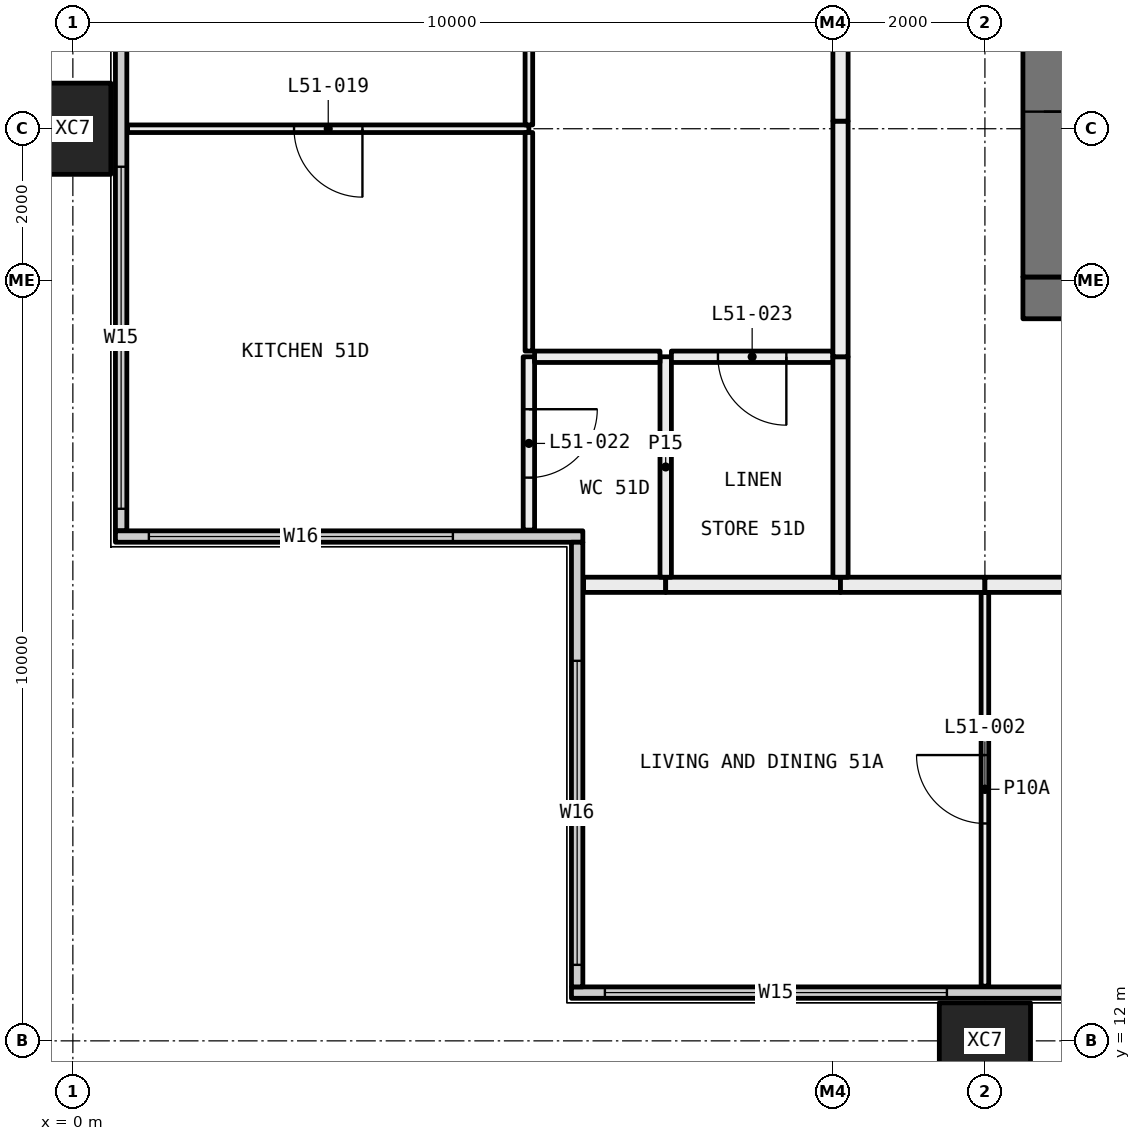
"""IFC4 building model, lengths in metres.
Left out: names, types, materials, properties, quantities, classifications, styles, units other than length and angle.
Written with IfcOpenShell. Run it as: python <this file> out.ifc"""

import sys

from ifc_helpers import new_model, si_unit, direction, frame, frame_2d, origin, origin_2d, place, context, subcontext, project, spatial, rectangle, hollow_rectangle, extrude, element, fill, save


model = new_model("IFC4")
c1 = context("Model", 3, precision=1e-05, world=origin(), true_north=direction((0.0, 1.0)))
c2 = subcontext(c1, "Body", "Model", "MODEL_VIEW")
j1 = project(units=[si_unit("LENGTHUNIT", "METRE"), si_unit("PLANEANGLEUNIT", "RADIAN")], contexts=[c1])
p1 = place(None, origin())
s1 = spatial("IfcSite", under=j1, at=p1, CompositionType="ELEMENT")
p2 = place(p1, origin())
s2 = spatial("IfcBuilding", under=s1, at=p2, CompositionType="ELEMENT")
p3 = place(p2, frame((0.0, 0.0, 192.75)))
s3 = spatial("IfcBuildingStorey", under=s2, at=p3, CompositionType="ELEMENT", Elevation=192.75)
for number, where, z_axis, x_axis in (
    (1, (0.0, 24.0, -0.4), (0.0, 0.0, 1.0), (0.0, 1.0, 0.0)),
    (2, (12.0, 12.0, -0.4), (0.0, 0.0, 1.0), (1.0, 0.0, 0.0)),
):
    element("IfcColumn", number, at=place(p3, frame(where, z_axis=z_axis, x_axis=x_axis)), inside=s3, PredefinedType="COLUMN", context=c2, shape_type="SweptSolid", body=[
        extrude(hollow_rectangle(XDim=1.2, YDim=1.0, WallThickness=0.045, at=origin_2d()), origin(), (0.0, 0.0, 1.0), 3.45),
    ])
p4 = place(p3, frame((6.56, 12.635, 0.0), z_axis=(0.0, 0.0, 1.0), x_axis=(1.0, 0.0, 0.0)))
e3 = element("IfcWall", 3, at=p4, inside=s3, PredefinedType="ELEMENTEDWALL", context=c2, shape_type="SweptSolid", body=[
    extrude(rectangle(XDim=46.88, YDim=0.15, at=frame_2d((23.44, 0.0))), origin(), (0.0, 0.0, 1.0), 3.05),
])
p5 = place(p4, frame((0.44, 0.0, 0.45)))
e4 = element("IfcOpeningElement", 4, at=p5, cuts=e3, PredefinedType="OPENING", context=c2, shape_type="SweptSolid", body=[
    extrude(rectangle(XDim=4.5, YDim=2.55, at=frame_2d((2.25, 1.275))), frame((0.0, 0.085, 0.0), z_axis=(0.0, -1.0, 0.0), x_axis=(1.0, 0.0, 0.0)), (0.0, 0.0, 1.0), 0.17),
])
p6 = place(p4, frame((7.69, 0.0, 0.45)))
e5 = element("IfcOpeningElement", 5, at=p6, cuts=e3, PredefinedType="OPENING", context=c2, shape_type="SweptSolid", body=[
    extrude(rectangle(XDim=3.25, YDim=2.55, at=frame_2d((1.625, 1.275))), frame((0.0, 0.085, 0.0), z_axis=(0.0, -1.0, 0.0), x_axis=(1.0, 0.0, 0.0)), (0.0, 0.0, 1.0), 0.17),
])
p7 = place(p4, frame((11.94, 0.0, 0.45)))
e6 = element("IfcOpeningElement", 6, at=p7, cuts=e3, PredefinedType="OPENING", context=c2, shape_type="SweptSolid", body=[
    extrude(rectangle(XDim=3.25, YDim=2.55, at=frame_2d((1.625, 1.275))), frame((0.0, 0.085, 0.0), z_axis=(0.0, -1.0, 0.0), x_axis=(1.0, 0.0, 0.0)), (0.0, 0.0, 1.0), 0.17),
])
p8 = place(p4, frame((19.69, 0.0, 0.45)))
e7 = element("IfcOpeningElement", 7, at=p8, cuts=e3, PredefinedType="OPENING", context=c2, shape_type="SweptSolid", body=[
    extrude(rectangle(XDim=3.25, YDim=2.55, at=frame_2d((1.625, 1.275))), frame((0.0, 0.085, 0.0), z_axis=(0.0, -1.0, 0.0), x_axis=(1.0, 0.0, 0.0)), (0.0, 0.0, 1.0), 0.17),
])
p9 = place(p4, frame((23.94, 0.0, 0.45)))
e8 = element("IfcOpeningElement", 8, at=p9, cuts=e3, PredefinedType="OPENING", context=c2, shape_type="SweptSolid", body=[
    extrude(rectangle(XDim=2.0, YDim=2.55, at=frame_2d((1.0, 1.275))), frame((0.0, 0.085, 0.0), z_axis=(0.0, -1.0, 0.0), x_axis=(1.0, 0.0, 0.0)), (0.0, 0.0, 1.0), 0.17),
])
p10 = place(p4, frame((31.69, 0.0, 0.45)))
e9 = element("IfcOpeningElement", 9, at=p10, cuts=e3, PredefinedType="OPENING", context=c2, shape_type="SweptSolid", body=[
    extrude(rectangle(XDim=3.25, YDim=2.55, at=frame_2d((1.625, 1.275))), frame((0.0, 0.085, 0.0), z_axis=(0.0, -1.0, 0.0), x_axis=(1.0, 0.0, 0.0)), (0.0, 0.0, 1.0), 0.17),
])
p11 = place(p4, frame((35.94, 0.0, 0.45)))
e10 = element("IfcOpeningElement", 10, at=p11, cuts=e3, PredefinedType="OPENING", context=c2, shape_type="SweptSolid", body=[
    extrude(rectangle(XDim=3.25, YDim=2.55, at=frame_2d((1.625, 1.275))), frame((0.0, 0.085, 0.0), z_axis=(0.0, -1.0, 0.0), x_axis=(1.0, 0.0, 0.0)), (0.0, 0.0, 1.0), 0.17),
])
p12 = place(p4, frame((41.94, 0.0, 0.45)))
e11 = element("IfcOpeningElement", 11, at=p12, cuts=e3, PredefinedType="OPENING", context=c2, shape_type="SweptSolid", body=[
    extrude(rectangle(XDim=4.5, YDim=2.55, at=frame_2d((2.25, 1.275))), frame((0.0, 0.085, 0.0), z_axis=(0.0, -1.0, 0.0), x_axis=(1.0, 0.0, 0.0)), (0.0, 0.0, 1.0), 0.17),
])
p13 = place(p3, frame((0.635, 18.71, 0.0), z_axis=(0.0, 0.0, 1.0), x_axis=(0.0, 1.0, 0.0)))
e12 = element("IfcWall", 12, at=p13, inside=s3, PredefinedType="ELEMENTEDWALL", context=c2, shape_type="SweptSolid", body=[
    extrude(rectangle(XDim=22.58, YDim=0.15, at=frame_2d((11.29, 0.0))), origin(), (0.0, 0.0, 1.0), 3.05),
])
p14 = place(p13, frame((0.29, 0.0, 0.45)))
e13 = element("IfcOpeningElement", 13, at=p14, cuts=e12, PredefinedType="OPENING", context=c2, shape_type="SweptSolid", body=[
    extrude(rectangle(XDim=4.5, YDim=2.55, at=frame_2d((2.25, 1.275))), frame((0.0, 0.085, 0.0), z_axis=(0.0, -1.0, 0.0), x_axis=(1.0, 0.0, 0.0)), (0.0, 0.0, 1.0), 0.17),
])
p15 = place(p13, frame((7.54, 0.0, 0.45)))
e14 = element("IfcOpeningElement", 14, at=p15, cuts=e12, PredefinedType="OPENING", context=c2, shape_type="SweptSolid", body=[
    extrude(rectangle(XDim=3.25, YDim=2.55, at=frame_2d((1.625, 1.275))), frame((0.0, 0.085, 0.0), z_axis=(0.0, -1.0, 0.0), x_axis=(1.0, 0.0, 0.0)), (0.0, 0.0, 1.0), 0.17),
])
p16 = place(p13, frame((11.79, 0.0, 0.45)))
e15 = element("IfcOpeningElement", 15, at=p16, cuts=e12, PredefinedType="OPENING", context=c2, shape_type="SweptSolid", body=[
    extrude(rectangle(XDim=2.0, YDim=2.55, at=frame_2d((1.0, 1.275))), frame((0.0, 0.085, 0.0), z_axis=(0.0, -1.0, 0.0), x_axis=(1.0, 0.0, 0.0)), (0.0, 0.0, 1.0), 0.17),
])
p17 = place(p13, frame((17.79, 0.0, 0.45)))
e16 = element("IfcOpeningElement", 16, at=p17, cuts=e12, PredefinedType="OPENING", context=c2, shape_type="SweptSolid", body=[
    extrude(rectangle(XDim=4.5, YDim=2.55, at=frame_2d((2.25, 1.275))), frame((0.0, 0.085, 0.0), z_axis=(0.0, -1.0, 0.0), x_axis=(1.0, 0.0, 0.0)), (0.0, 0.0, 1.0), 0.17),
])
p18 = place(p3, frame((0.56, 18.635, 0.0), z_axis=(0.0, 0.0, 1.0), x_axis=(1.0, 0.0, 0.0)))
e17 = element("IfcWall", 17, at=p18, inside=s3, PredefinedType="ELEMENTEDWALL", context=c2, shape_type="SweptSolid", body=[
    extrude(rectangle(XDim=6.15, YDim=0.15, at=frame_2d((3.075, 0.0))), origin(), (0.0, 0.0, 1.0), 3.05),
])
p19 = place(p18, frame((0.44, 0.0, 0.45)))
e18 = element("IfcOpeningElement", 18, at=p19, cuts=e17, PredefinedType="OPENING", context=c2, shape_type="SweptSolid", body=[
    extrude(rectangle(XDim=4.0, YDim=2.55, at=frame_2d((2.0, 1.275))), frame((0.0, 0.085, 0.0), z_axis=(0.0, -1.0, 0.0), x_axis=(1.0, 0.0, 0.0)), (0.0, 0.0, 1.0), 0.17),
])
p20 = place(p3, frame((6.635, 12.71, 0.0), z_axis=(0.0, 0.0, 1.0), x_axis=(0.0, 1.0, 0.0)))
e19 = element("IfcWall", 19, at=p20, inside=s3, PredefinedType="ELEMENTEDWALL", context=c2, shape_type="SweptSolid", body=[
    extrude(rectangle(XDim=5.85, YDim=0.15, at=frame_2d((2.925, 0.0))), origin(), (0.0, 0.0, 1.0), 3.05),
])
p21 = place(p20, frame((0.29, 0.0, 0.45)))
e20 = element("IfcOpeningElement", 20, at=p21, cuts=e19, PredefinedType="OPENING", context=c2, shape_type="SweptSolid", body=[
    extrude(rectangle(XDim=4.0, YDim=2.55, at=frame_2d((2.0, 1.275))), frame((0.0, 0.085, 0.0), z_axis=(0.0, -1.0, 0.0), x_axis=(1.0, 0.0, 0.0)), (0.0, 0.0, 1.0), 0.17),
])
p22 = place(p3, frame((12.0, 12.72, 0.0), z_axis=(0.0, 0.0, 1.0), x_axis=(0.0, 1.0, 0.0)))
e21 = element("IfcWall", 21, at=p22, inside=s3, PredefinedType="PARTITIONING", context=c2, shape_type="SweptSolid", body=[
    extrude(rectangle(XDim=5.18, YDim=0.1, at=frame_2d((2.59, 0.0))), origin(), (0.0, 0.0, 1.0), 3.05),
])
p23 = place(p22, frame((2.14, 0.0, 0.0)))
e22 = element("IfcOpeningElement", 22, at=p23, cuts=e21, PredefinedType="OPENING", context=c2, shape_type="SweptSolid", body=[
    extrude(rectangle(XDim=0.9, YDim=2.1, at=frame_2d((0.45, 1.05))), frame((0.0, 0.06, 0.0), z_axis=(0.0, -1.0, 0.0), x_axis=(1.0, 0.0, 0.0)), (0.0, 0.0, 1.0), 0.12),
])
p24 = place(p3, frame((7.8, 18.0, 0.0), z_axis=(0.0, 0.0, 1.0), x_axis=(-1.0, 0.0, 0.0)))
e23 = element("IfcWall", 23, at=p24, inside=s3, PredefinedType="PARTITIONING", context=c2, shape_type="SweptSolid", body=[
    extrude(rectangle(XDim=1.08, YDim=0.2, at=frame_2d((0.54, 0.0))), origin(), (0.0, 0.0, 1.0), 3.05),
])
p25 = place(p3, frame((10.1, 18.0, 0.0), z_axis=(0.0, 0.0, 1.0), x_axis=(-1.0, 0.0, 0.0)))
e24 = element("IfcWall", 24, at=p25, inside=s3, PredefinedType="PARTITIONING", context=c2, shape_type="SweptSolid", body=[
    extrude(rectangle(XDim=2.3, YDim=0.2, at=frame_2d((1.15, 0.0))), origin(), (0.0, 0.0, 1.0), 3.05),
])
p26 = place(p3, frame((12.0, 18.0, 0.0), z_axis=(0.0, 0.0, 1.0), x_axis=(-1.0, 0.0, 0.0)))
e25 = element("IfcWall", 25, at=p26, inside=s3, PredefinedType="PARTITIONING", context=c2, shape_type="SweptSolid", body=[
    extrude(rectangle(XDim=1.9, YDim=0.2, at=frame_2d((0.95, 0.0))), origin(), (0.0, 0.0, 1.0), 3.05),
])
p27 = place(p3, frame((18.0, 18.0, 0.0), z_axis=(0.0, 0.0, 1.0), x_axis=(-1.0, 0.0, 0.0)))
e26 = element("IfcWall", 26, at=p27, inside=s3, PredefinedType="PARTITIONING", context=c2, shape_type="SweptSolid", body=[
    extrude(rectangle(XDim=6.0, YDim=0.2, at=frame_2d((3.0, 0.0))), origin(), (0.0, 0.0, 1.0), 3.05),
])
p28 = place(p27, frame((2.5, 0.0, 0.0)))
e27 = element("IfcOpeningElement", 27, at=p28, cuts=e26, PredefinedType="OPENING", context=c2, shape_type="SweptSolid", body=[
    extrude(rectangle(XDim=1.0, YDim=2.1, at=frame_2d((0.5, 1.05))), frame((0.0, 0.11, 0.0), z_axis=(0.0, -1.0, 0.0), x_axis=(1.0, 0.0, 0.0)), (0.0, 0.0, 1.0), 0.22),
])
p29 = place(p3, frame((6.0, 24.0, 0.0), z_axis=(0.0, 0.0, 1.0), x_axis=(-1.0, 0.0, 0.0)))
e28 = element("IfcWall", 28, at=p29, inside=s3, PredefinedType="PARTITIONING", context=c2, shape_type="SweptSolid", body=[
    extrude(rectangle(XDim=5.28, YDim=0.1, at=frame_2d((2.64, 0.0))), origin(), (0.0, 0.0, 1.0), 2.45),
])
p30 = place(p29, frame((2.19, 0.0, 0.0)))
e29 = element("IfcOpeningElement", 29, at=p30, cuts=e28, PredefinedType="OPENING", context=c2, shape_type="SweptSolid", body=[
    extrude(rectangle(XDim=0.9, YDim=2.1, at=frame_2d((0.45, 1.05))), frame((0.0, 0.06, 0.0), z_axis=(0.0, -1.0, 0.0), x_axis=(1.0, 0.0, 0.0)), (0.0, 0.0, 1.0), 0.12),
])
p31 = place(p3, frame((6.0, 18.72, 0.0), z_axis=(0.0, 0.0, 1.0), x_axis=(0.0, 1.0, 0.0)))
e30 = element("IfcWall", 30, at=p31, inside=s3, PredefinedType="PARTITIONING", context=c2, shape_type="SweptSolid", body=[
    extrude(rectangle(XDim=2.28, YDim=0.15, at=frame_2d((1.14, 0.0))), origin(), (0.0, 0.0, 1.0), 3.05),
])
p32 = place(p31, frame((0.69, 0.0, 0.0)))
e31 = element("IfcOpeningElement", 31, at=p32, cuts=e30, PredefinedType="OPENING", context=c2, shape_type="SweptSolid", body=[
    extrude(rectangle(XDim=0.9, YDim=2.1, at=frame_2d((0.45, 1.05))), frame((0.0, 0.085, 0.0), z_axis=(0.0, -1.0, 0.0), x_axis=(1.0, 0.0, 0.0)), (0.0, 0.0, 1.0), 0.17),
])
p33 = place(p3, frame((6.0, 21.075, 0.0), z_axis=(0.0, 0.0, 1.0), x_axis=(0.0, 1.0, 0.0)))
e32 = element("IfcWall", 32, at=p33, inside=s3, PredefinedType="PARTITIONING", context=c2, shape_type="SweptSolid", body=[
    extrude(rectangle(XDim=2.875, YDim=0.1, at=frame_2d((1.438, 0.0))), origin(), (0.0, 0.0, 1.0), 2.45),
])
p34 = place(p3, frame((6.0, 24.05, 0.0), z_axis=(0.0, 0.0, 1.0), x_axis=(0.0, 1.0, 0.0)))
e33 = element("IfcWall", 33, at=p34, inside=s3, PredefinedType="PARTITIONING", context=c2, shape_type="SweptSolid", body=[
    extrude(rectangle(XDim=8.95, YDim=0.1, at=frame_2d((4.475, 0.0))), origin(), (0.0, 0.0, 1.0), 2.45),
])
p35 = place(p3, frame((7.8, 18.1, 0.0), z_axis=(0.0, 0.0, 1.0), x_axis=(0.0, 1.0, 0.0)))
e34 = element("IfcWall", 34, at=p35, inside=s3, PredefinedType="PARTITIONING", context=c2, shape_type="SweptSolid", body=[
    extrude(rectangle(XDim=2.9, YDim=0.15, at=frame_2d((1.45, 0.0))), origin(), (0.0, 0.0, 1.0), 3.05),
])
p36 = place(p3, frame((7.725, 21.0, 0.0), z_axis=(0.0, 0.0, 1.0), x_axis=(-1.0, 0.0, 0.0)))
e35 = element("IfcWall", 35, at=p36, inside=s3, PredefinedType="PARTITIONING", context=c2, shape_type="SweptSolid", body=[
    extrude(rectangle(XDim=1.65, YDim=0.15, at=frame_2d((0.825, 0.0))), origin(), (0.0, 0.0, 1.0), 3.05),
])
p37 = place(p3, frame((10.0, 21.0, 0.0), z_axis=(0.0, 0.0, 1.0), x_axis=(-1.0, 0.0, 0.0)))
e36 = element("IfcWall", 36, at=p37, inside=s3, PredefinedType="PARTITIONING", context=c2, shape_type="SweptSolid", body=[
    extrude(rectangle(XDim=2.125, YDim=0.15, at=frame_2d((1.062, 0.0))), origin(), (0.0, 0.0, 1.0), 3.05),
])
p38 = place(p37, frame((0.613, 0.0, 0.0)))
e37 = element("IfcOpeningElement", 37, at=p38, cuts=e36, PredefinedType="OPENING", context=c2, shape_type="SweptSolid", body=[
    extrude(rectangle(XDim=0.9, YDim=2.1, at=frame_2d((0.45, 1.05))), frame((0.0, 0.085, 0.0), z_axis=(0.0, -1.0, 0.0), x_axis=(1.0, 0.0, 0.0)), (0.0, 0.0, 1.0), 0.17),
])
p39 = place(p3, frame((10.1, 18.1, 0.0), z_axis=(0.0, 0.0, 1.0), x_axis=(0.0, 1.0, 0.0)))
e38 = element("IfcWall", 38, at=p39, inside=s3, PredefinedType="PARTITIONING", context=c2, shape_type="SweptSolid", body=[
    extrude(rectangle(XDim=2.9, YDim=0.2, at=frame_2d((1.45, 0.0))), origin(), (0.0, 0.0, 1.0), 3.05),
])
p40 = place(p3, frame((10.1, 21.0, 0.0), z_axis=(0.0, 0.0, 1.0), x_axis=(0.0, 1.0, 0.0)))
e39 = element("IfcWall", 39, at=p40, inside=s3, PredefinedType="PARTITIONING", context=c2, shape_type="SweptSolid", body=[
    extrude(rectangle(XDim=3.1, YDim=0.2, at=frame_2d((1.55, 0.0))), origin(), (0.0, 0.0, 1.0), 2.45),
])
p41 = place(p3, frame((10.1, 24.1, 0.0), z_axis=(0.0, 0.0, 1.0), x_axis=(0.0, 1.0, 0.0)))
e40 = element("IfcWall", 40, at=p41, inside=s3, PredefinedType="PARTITIONING", context=c2, shape_type="SweptSolid", body=[
    extrude(rectangle(XDim=8.9, YDim=0.2, at=frame_2d((4.45, 0.0))), origin(), (0.0, 0.0, 1.0), 3.05),
])
p42 = place(p3, frame((12.5, 21.775, 0.0), z_axis=(0.0, 0.0, 1.0), x_axis=(1.0, 0.0, 0.0)))
e41 = element("IfcWall", 41, at=p42, inside=s3, PredefinedType="SHEAR", context=c2, shape_type="SweptSolid", body=[
    extrude(rectangle(XDim=11.0, YDim=0.55, at=frame_2d((5.5, 0.0))), origin(), (0.0, 0.0, 1.0), 3.05),
])
p43 = place(p3, frame((12.775, 22.05, 0.0), z_axis=(0.0, 0.0, 1.0), x_axis=(0.0, 1.0, 0.0)))
e42 = element("IfcWall", 42, at=p43, inside=s3, PredefinedType="SHEAR", context=c2, shape_type="SweptSolid", body=[
    extrude(rectangle(XDim=15.9, YDim=0.55, at=frame_2d((7.95, 0.0))), origin(), (0.0, 0.0, 1.0), 3.05),
])
p44 = place(p43, frame((8.4, 0.0, 0.0)))
e43 = element("IfcOpeningElement", 43, at=p44, cuts=e42, PredefinedType="OPENING", context=c2, shape_type="SweptSolid", body=[
    extrude(rectangle(XDim=1.6, YDim=2.1, at=frame_2d((0.8, 1.05))), frame((0.0, 0.285, 0.0), z_axis=(0.0, -1.0, 0.0), x_axis=(1.0, 0.0, 0.0)), (0.0, 0.0, 1.0), 0.57),
])
p45 = place(p43, frame((2.175, 0.0, 0.0)))
e44 = element("IfcOpeningElement", 44, at=p45, cuts=e42, PredefinedType="OPENING", context=c2, shape_type="SweptSolid", body=[
    extrude(rectangle(XDim=1.0, YDim=2.1, at=frame_2d((0.5, 1.05))), frame((0.0, 0.285, 0.0), z_axis=(0.0, -1.0, 0.0), x_axis=(1.0, 0.0, 0.0)), (0.0, 0.0, 1.0), 0.57),
])
p46 = place(p5, origin())
e45 = element("IfcWindow", 45, at=p46, inside=s3, PartitioningType="SINGLE_PANEL", PredefinedType="WINDOW", context=c2, shape_type="SweptSolid", body=[
    extrude(rectangle(XDim=4.5, YDim=2.55, at=frame_2d((2.25, 1.275))), frame((0.0, 0.03, 0.0), z_axis=(0.0, -1.0, 0.0), x_axis=(1.0, 0.0, 0.0)), (0.0, 0.0, 1.0), 0.06),
])
fill(e4, e45)
p47 = place(p14, origin())
e46 = element("IfcWindow", 46, at=p47, inside=s3, PartitioningType="SINGLE_PANEL", PredefinedType="WINDOW", context=c2, shape_type="SweptSolid", body=[
    extrude(rectangle(XDim=4.5, YDim=2.55, at=frame_2d((2.25, 1.275))), frame((0.0, 0.03, 0.0), z_axis=(0.0, -1.0, 0.0), x_axis=(1.0, 0.0, 0.0)), (0.0, 0.0, 1.0), 0.06),
])
fill(e13, e46)
p48 = place(p19, origin())
e47 = element("IfcWindow", 47, at=p48, inside=s3, PartitioningType="SINGLE_PANEL", PredefinedType="WINDOW", context=c2, shape_type="SweptSolid", body=[
    extrude(rectangle(XDim=4.0, YDim=2.55, at=frame_2d((2.0, 1.275))), frame((0.0, 0.03, 0.0), z_axis=(0.0, -1.0, 0.0), x_axis=(1.0, 0.0, 0.0)), (0.0, 0.0, 1.0), 0.06),
])
fill(e18, e47)
p49 = place(p21, origin())
e48 = element("IfcWindow", 48, at=p49, inside=s3, PartitioningType="SINGLE_PANEL", PredefinedType="WINDOW", context=c2, shape_type="SweptSolid", body=[
    extrude(rectangle(XDim=4.0, YDim=2.55, at=frame_2d((2.0, 1.275))), frame((0.0, 0.03, 0.0), z_axis=(0.0, -1.0, 0.0), x_axis=(1.0, 0.0, 0.0)), (0.0, 0.0, 1.0), 0.06),
])
fill(e20, e48)
p50 = place(p23, origin())
e49 = element("IfcDoor", 49, at=p50, inside=s3, OperationType="SINGLE_SWING_LEFT", PredefinedType="DOOR", context=c2, shape_type="SweptSolid", body=[
    extrude(rectangle(XDim=0.9, YDim=2.1, at=frame_2d((0.45, 1.05))), frame((0.0, 0.025, 0.0), z_axis=(0.0, -1.0, 0.0), x_axis=(1.0, 0.0, 0.0)), (0.0, 0.0, 1.0), 0.05),
])
fill(e22, e49)
p51 = place(p30, origin())
e50 = element("IfcDoor", 50, at=p51, inside=s3, OperationType="SINGLE_SWING_RIGHT", PredefinedType="DOOR", context=c2, shape_type="SweptSolid", body=[
    extrude(rectangle(XDim=0.9, YDim=2.1, at=frame_2d((0.45, 1.05))), frame((0.0, 0.025, 0.0), z_axis=(0.0, -1.0, 0.0), x_axis=(1.0, 0.0, 0.0)), (0.0, 0.0, 1.0), 0.05),
])
fill(e29, e50)
p52 = place(p32, frame((0.9, 0.0, 0.0), x_axis=(-1.0, 0.0, 0.0)))
e51 = element("IfcDoor", 51, at=p52, inside=s3, OperationType="SINGLE_SWING_RIGHT", PredefinedType="DOOR", context=c2, shape_type="SweptSolid", body=[
    extrude(rectangle(XDim=0.9, YDim=2.1, at=frame_2d((0.45, 1.05))), frame((0.0, 0.025, 0.0), z_axis=(0.0, -1.0, 0.0), x_axis=(1.0, 0.0, 0.0)), (0.0, 0.0, 1.0), 0.05),
])
fill(e31, e51)
p53 = place(p38, origin())
e52 = element("IfcDoor", 52, at=p53, inside=s3, OperationType="SINGLE_SWING_RIGHT", PredefinedType="DOOR", context=c2, shape_type="SweptSolid", body=[
    extrude(rectangle(XDim=0.9, YDim=2.1, at=frame_2d((0.45, 1.05))), frame((0.0, 0.025, 0.0), z_axis=(0.0, -1.0, 0.0), x_axis=(1.0, 0.0, 0.0)), (0.0, 0.0, 1.0), 0.05),
])
fill(e37, e52)
p54 = place(p45, frame((1.0, 0.0, 0.0), x_axis=(-1.0, 0.0, 0.0)))
e53 = element("IfcDoor", 53, at=p54, inside=s3, OperationType="SINGLE_SWING_LEFT", PredefinedType="DOOR", context=c2, shape_type="SweptSolid", body=[
    extrude(rectangle(XDim=1.0, YDim=2.1, at=frame_2d((0.5, 1.05))), frame((0.0, 0.025, 0.0), z_axis=(0.0, -1.0, 0.0), x_axis=(1.0, 0.0, 0.0)), (0.0, 0.0, 1.0), 0.05),
])
fill(e44, e53)
save(model, sys.argv[1])
